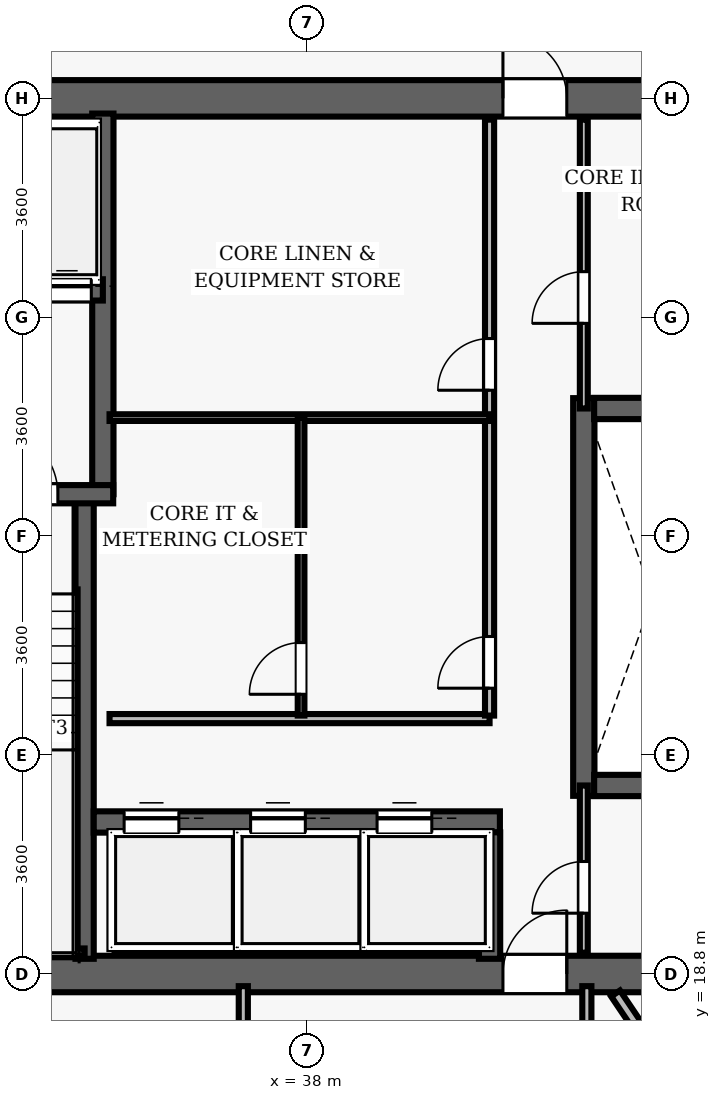
"""IFC4 building model, lengths in metres.
Left out: names, types, materials, properties, quantities, classifications, styles, units other than length and angle.
Written with IfcOpenShell. Run it as: python <this file> out.ifc"""

import sys

from ifc_helpers import new_model, si_unit, direction, frame, frame_2d, origin, place, context, subcontext, project, spatial, rectangle, extrude, element, fill, save


model = new_model("IFC4")
c1 = context("Model", 3, precision=1e-05, world=origin(), true_north=direction((0.0, 1.0)))
c2 = subcontext(c1, "Body", "Model", "MODEL_VIEW")
j1 = project(units=[si_unit("LENGTHUNIT", "METRE"), si_unit("PLANEANGLEUNIT", "RADIAN")], contexts=[c1])
p1 = place(None, origin())
s1 = spatial("IfcSite", under=j1, at=p1, CompositionType="ELEMENT")
p2 = place(p1, origin())
s2 = spatial("IfcBuilding", under=s1, at=p2, CompositionType="ELEMENT")
p3 = place(p2, frame((0.0, 0.0, 144.8)))
s3 = spatial("IfcBuildingStorey", under=s2, at=p3, CompositionType="ELEMENT", Elevation=144.8)
p4 = place(p3, frame((26.7, 18.8, 0.0), z_axis=(0.0, 0.0, 1.0), x_axis=(1.0, 0.0, 0.0)))
e1 = element("IfcWall", 1, at=p4, inside=s3, PredefinedType="SHEAR", context=c2, shape_type="SweptSolid", body=[
    extrude(rectangle(XDim=22.6, YDim=0.6, at=frame_2d((11.3, 0.0))), origin(), (0.0, 0.0, 1.0), 3.5),
])
p5 = place(p4, frame((14.52, 0.0, 0.0)))
e2 = element("IfcOpeningElement", 2, at=p5, cuts=e1, PredefinedType="OPENING", context=c2, shape_type="SweptSolid", body=[
    extrude(rectangle(XDim=1.05, YDim=2.15, at=frame_2d((0.525, 1.075))), frame((0.0, 0.31, 0.0), z_axis=(0.0, -1.0, 0.0), x_axis=(1.0, 0.0, 0.0)), (0.0, 0.0, 1.0), 0.62),
])
p6 = place(p3, frame((26.7, 33.2, 0.0), z_axis=(0.0, 0.0, 1.0), x_axis=(1.0, 0.0, 0.0)))
e3 = element("IfcWall", 3, at=p6, inside=s3, PredefinedType="SHEAR", context=c2, shape_type="SweptSolid", body=[
    extrude(rectangle(XDim=22.6, YDim=0.6, at=frame_2d((11.3, 0.0))), origin(), (0.0, 0.0, 1.0), 3.5),
])
p7 = place(p6, frame((4.62, 0.0, 0.0)))
e4 = element("IfcOpeningElement", 4, at=p7, cuts=e3, PredefinedType="OPENING", context=c2, shape_type="SweptSolid", body=[
    extrude(rectangle(XDim=1.05, YDim=2.15, at=frame_2d((0.525, 1.075))), frame((0.0, 0.31, 0.0), z_axis=(0.0, -1.0, 0.0), x_axis=(1.0, 0.0, 0.0)), (0.0, 0.0, 1.0), 0.62),
])
p8 = place(p6, frame((14.52, 0.0, 0.0)))
e5 = element("IfcOpeningElement", 5, at=p8, cuts=e3, PredefinedType="OPENING", context=c2, shape_type="SweptSolid", body=[
    extrude(rectangle(XDim=1.05, YDim=2.15, at=frame_2d((0.525, 1.075))), frame((0.0, 0.31, 0.0), z_axis=(0.0, -1.0, 0.0), x_axis=(1.0, 0.0, 0.0)), (0.0, 0.0, 1.0), 0.62),
])
p9 = place(p3, frame((34.34, 19.05, 0.0), z_axis=(0.0, 0.0, 1.0), x_axis=(0.0, 1.0, 0.0)))
e6 = element("IfcWall", 6, at=p9, inside=s3, PredefinedType="SHEAR", context=c2, shape_type="SweptSolid", body=[
    extrude(rectangle(XDim=7.5, YDim=0.3, at=frame_2d((3.75, 0.0))), origin(), (0.0, 0.0, 1.0), 3.5),
])
p10 = place(p3, frame((34.64, 26.69, 0.0), z_axis=(0.0, 0.0, 1.0), x_axis=(0.0, 1.0, 0.0)))
e7 = element("IfcWall", 7, at=p10, inside=s3, PredefinedType="SHEAR", context=c2, shape_type="SweptSolid", body=[
    extrude(rectangle(XDim=6.26, YDim=0.35, at=frame_2d((3.13, 0.0))), origin(), (0.0, 0.0, 1.0), 3.5),
])
p11 = place(p3, frame((31.25, 26.69, 0.0), z_axis=(0.0, 0.0, 1.0), x_axis=(1.0, 0.0, 0.0)))
e8 = element("IfcWall", 8, at=p11, inside=s3, PredefinedType="SHEAR", context=c2, shape_type="SweptSolid", body=[
    extrude(rectangle(XDim=3.56, YDim=0.3, at=frame_2d((1.78, 0.0))), origin(), (0.0, 0.0, 1.0), 3.5),
])
p12 = place(p11, frame((1.55, 0.0, 0.0)))
e9 = element("IfcOpeningElement", 9, at=p12, cuts=e8, PredefinedType="OPENING", context=c2, shape_type="SweptSolid", body=[
    extrude(rectangle(XDim=1.1, YDim=2.15, at=frame_2d((0.55, 1.075))), frame((0.0, 0.16, 0.0), z_axis=(0.0, -1.0, 0.0), x_axis=(1.0, 0.0, 0.0)), (0.0, 0.0, 1.0), 0.32),
])
p13 = place(p3, frame((31.3, 19.16, 0.0), z_axis=(0.0, 0.0, 1.0), x_axis=(1.0, 0.0, 0.0)))
e10 = element("IfcWall", 10, at=p13, inside=s3, PredefinedType="SHEAR", context=c2, shape_type="SweptSolid", body=[
    extrude(rectangle(XDim=3.04, YDim=0.12, at=frame_2d((1.52, 0.0))), origin(), (0.0, 0.0, 1.0), 3.5),
])
p14 = place(p3, frame((32.23, 30.05, 0.0), z_axis=(0.0, 0.0, 1.0), x_axis=(1.0, 0.0, 0.0)))
e11 = element("IfcWall", 11, at=p14, inside=s3, PredefinedType="SHEAR", context=c2, shape_type="SweptSolid", body=[
    extrude(rectangle(XDim=2.41, YDim=0.35, at=frame_2d((1.205, 0.0))), origin(), (0.0, 0.0, 1.0), 2.675),
])
p15 = place(p14, frame((0.42, 0.0, 0.0)))
e12 = element("IfcOpeningElement", 12, at=p15, cuts=e11, PredefinedType="OPENING", context=c2, shape_type="SweptSolid", body=[
    extrude(rectangle(XDim=0.8, YDim=2.15, at=frame_2d((0.4, 1.075))), frame((0.0, 0.185, 0.0), z_axis=(0.0, -1.0, 0.0), x_axis=(1.0, 0.0, 0.0)), (0.0, 0.0, 1.0), 0.37),
])
p16 = place(p14, frame((1.42, 0.0, 0.0)))
e13 = element("IfcOpeningElement", 13, at=p16, cuts=e11, PredefinedType="OPENING", context=c2, shape_type="SweptSolid", body=[
    extrude(rectangle(XDim=0.8, YDim=2.15, at=frame_2d((0.4, 1.075))), frame((0.0, 0.185, 0.0), z_axis=(0.0, -1.0, 0.0), x_axis=(1.0, 0.0, 0.0)), (0.0, 0.0, 1.0), 0.37),
])
p17 = place(p3, frame((42.55, 21.73, 0.0), z_axis=(0.0, 0.0, 1.0), x_axis=(0.0, 1.0, 0.0)))
e14 = element("IfcWall", 14, at=p17, inside=s3, PredefinedType="SHEAR", context=c2, shape_type="SweptSolid", body=[
    extrude(rectangle(XDim=6.54, YDim=0.35, at=frame_2d((3.27, 0.0))), origin(), (0.0, 0.0, 1.0), 2.675),
])
for number, where, z_axis, x_axis in (
    (15, (42.72, 21.9, 0.0), (0.0, 0.0, 1.0), (1.0, 0.0, 0.0)),
    (16, (42.72, 28.1, 0.0), (0.0, 0.0, 1.0), (1.0, 0.0, 0.0)),
):
    element("IfcWall", number, at=place(p3, frame(where, z_axis=z_axis, x_axis=x_axis)), inside=s3, PredefinedType="SHEAR", context=c2, shape_type="SweptSolid", body=[
        extrude(rectangle(XDim=2.03, YDim=0.35, at=frame_2d((1.015, 0.0))), origin(), (0.0, 0.0, 1.0), 2.675),
    ])
p18 = place(p3, frame((34.49, 21.3, 0.0), z_axis=(0.0, 0.0, 1.0), x_axis=(1.0, 0.0, 0.0)))
e17 = element("IfcWall", 17, at=p18, inside=s3, PredefinedType="SHEAR", context=c2, shape_type="SweptSolid", body=[
    extrude(rectangle(XDim=6.68, YDim=0.35, at=frame_2d((3.34, 0.0))), origin(), (0.0, 0.0, 1.0), 2.675),
])
p19 = place(p18, frame((0.5, 0.0, 0.0)))
e18 = element("IfcOpeningElement", 18, at=p19, cuts=e17, PredefinedType="OPENING", context=c2, shape_type="SweptSolid", body=[
    extrude(rectangle(XDim=0.9, YDim=2.15, at=frame_2d((0.45, 1.075))), frame((0.0, 0.185, 0.0), z_axis=(0.0, -1.0, 0.0), x_axis=(1.0, 0.0, 0.0)), (0.0, 0.0, 1.0), 0.37),
])
p20 = place(p18, frame((2.58, 0.0, 0.0)))
e19 = element("IfcOpeningElement", 19, at=p20, cuts=e17, PredefinedType="OPENING", context=c2, shape_type="SweptSolid", body=[
    extrude(rectangle(XDim=0.9, YDim=2.15, at=frame_2d((0.45, 1.075))), frame((0.0, 0.185, 0.0), z_axis=(0.0, -1.0, 0.0), x_axis=(1.0, 0.0, 0.0)), (0.0, 0.0, 1.0), 0.37),
])
p21 = place(p18, frame((4.66, 0.0, 0.0)))
e20 = element("IfcOpeningElement", 20, at=p21, cuts=e17, PredefinedType="OPENING", context=c2, shape_type="SweptSolid", body=[
    extrude(rectangle(XDim=0.9, YDim=2.15, at=frame_2d((0.45, 1.075))), frame((0.0, 0.185, 0.0), z_axis=(0.0, -1.0, 0.0), x_axis=(1.0, 0.0, 0.0)), (0.0, 0.0, 1.0), 0.37),
])
p22 = place(p3, frame((41.0, 19.05, 0.0), z_axis=(0.0, 0.0, 1.0), x_axis=(0.0, 1.0, 0.0)))
e21 = element("IfcWall", 21, at=p22, inside=s3, PredefinedType="SHEAR", context=c2, shape_type="SweptSolid", body=[
    extrude(rectangle(XDim=2.08, YDim=0.35, at=frame_2d((1.04, 0.0))), origin(), (0.0, 0.0, 1.0), 2.675),
])
p23 = place(p3, frame((34.75, 23.0, 0.0), z_axis=(0.0, 0.0, 1.0), x_axis=(1.0, 0.0, 0.0)))
e22 = element("IfcWall", 22, at=p23, inside=s3, PredefinedType="PARTITIONING", context=c2, shape_type="SweptSolid", body=[
    extrude(rectangle(XDim=6.25, YDim=0.15, at=frame_2d((3.125, 0.0))), origin(), (0.0, 0.0, 1.0), 2.675),
])
p24 = place(p3, frame((41.0, 23.05, 0.0), z_axis=(0.0, 0.0, 1.0), x_axis=(0.0, 1.0, 0.0)))
e23 = element("IfcWall", 23, at=p24, inside=s3, PredefinedType="PARTITIONING", context=c2, shape_type="SweptSolid", body=[
    extrude(rectangle(XDim=9.8, YDim=0.15, at=frame_2d((4.9, 0.0))), origin(), (0.0, 0.0, 1.0), 2.675),
])
p25 = place(p24, frame((5.35, 0.0, 0.0)))
e24 = element("IfcOpeningElement", 24, at=p25, cuts=e23, PredefinedType="OPENING", context=c2, shape_type="SweptSolid", body=[
    extrude(rectangle(XDim=0.85, YDim=2.1, at=frame_2d((0.425, 1.05))), frame((0.0, 0.085, 0.0), z_axis=(0.0, -1.0, 0.0), x_axis=(1.0, 0.0, 0.0)), (0.0, 0.0, 1.0), 0.17),
])
p26 = place(p24, frame((0.45, 0.0, 0.0)))
e25 = element("IfcOpeningElement", 25, at=p26, cuts=e23, PredefinedType="OPENING", context=c2, shape_type="SweptSolid", body=[
    extrude(rectangle(XDim=0.85, YDim=2.1, at=frame_2d((0.425, 1.05))), frame((0.0, 0.085, 0.0), z_axis=(0.0, -1.0, 0.0), x_axis=(1.0, 0.0, 0.0)), (0.0, 0.0, 1.0), 0.17),
])
p27 = place(p3, frame((34.75, 27.95, 0.0), z_axis=(0.0, 0.0, 1.0), x_axis=(1.0, 0.0, 0.0)))
e26 = element("IfcWall", 26, at=p27, inside=s3, PredefinedType="PARTITIONING", context=c2, shape_type="SweptSolid", body=[
    extrude(rectangle(XDim=6.25, YDim=0.11, at=frame_2d((3.125, 0.0))), origin(), (0.0, 0.0, 1.0), 2.675),
])
p28 = place(p3, frame((37.9, 23.05, 0.0), z_axis=(0.0, 0.0, 1.0), x_axis=(0.0, 1.0, 0.0)))
e27 = element("IfcWall", 27, at=p28, inside=s3, PredefinedType="PARTITIONING", context=c2, shape_type="SweptSolid", body=[
    extrude(rectangle(XDim=4.9, YDim=0.11, at=frame_2d((2.45, 0.0))), origin(), (0.0, 0.0, 1.0), 2.675),
])
p29 = place(p28, frame((0.35, 0.0, 0.0)))
e28 = element("IfcOpeningElement", 28, at=p29, cuts=e27, PredefinedType="OPENING", context=c2, shape_type="SweptSolid", body=[
    extrude(rectangle(XDim=0.85, YDim=2.1, at=frame_2d((0.425, 1.05))), frame((0.0, 0.065, 0.0), z_axis=(0.0, -1.0, 0.0), x_axis=(1.0, 0.0, 0.0)), (0.0, 0.0, 1.0), 0.13),
])
p30 = place(p3, frame((42.55, 28.1, 0.0), z_axis=(0.0, 0.0, 1.0), x_axis=(0.0, 1.0, 0.0)))
e29 = element("IfcWall", 29, at=p30, inside=s3, PredefinedType="PARTITIONING", context=c2, shape_type="SweptSolid", body=[
    extrude(rectangle(XDim=4.75, YDim=0.13, at=frame_2d((2.375, 0.0))), origin(), (0.0, 0.0, 1.0), 2.675),
])
p31 = place(p30, frame((1.4, 0.0, 0.0)))
e30 = element("IfcOpeningElement", 30, at=p31, cuts=e29, PredefinedType="OPENING", context=c2, shape_type="SweptSolid", body=[
    extrude(rectangle(XDim=0.85, YDim=2.1, at=frame_2d((0.425, 1.05))), frame((0.0, 0.075, 0.0), z_axis=(0.0, -1.0, 0.0), x_axis=(1.0, 0.0, 0.0)), (0.0, 0.0, 1.0), 0.15),
])
p32 = place(p3, frame((42.55, 19.15, 0.0), z_axis=(0.0, 0.0, 1.0), x_axis=(0.0, 1.0, 0.0)))
e31 = element("IfcWall", 31, at=p32, inside=s3, PredefinedType="PARTITIONING", context=c2, shape_type="SweptSolid", body=[
    extrude(rectangle(XDim=2.75, YDim=0.13, at=frame_2d((1.375, 0.0))), origin(), (0.0, 0.0, 1.0), 2.675),
])
p33 = place(p32, frame((0.65, 0.0, 0.0)))
e32 = element("IfcOpeningElement", 32, at=p33, cuts=e31, PredefinedType="OPENING", context=c2, shape_type="SweptSolid", body=[
    extrude(rectangle(XDim=0.85, YDim=2.1, at=frame_2d((0.425, 1.05))), frame((0.0, 0.075, 0.0), z_axis=(0.0, -1.0, 0.0), x_axis=(1.0, 0.0, 0.0)), (0.0, 0.0, 1.0), 0.15),
])
p34 = place(p3, frame((36.95, 11.2, 0.0), z_axis=(0.0, 0.0, 1.0), x_axis=(0.0, 1.0, 0.0)))
e33 = element("IfcWall", 33, at=p34, inside=s3, PredefinedType="PARTITIONING", context=c2, shape_type="SweptSolid", body=[
    extrude(rectangle(XDim=7.4, YDim=0.15, at=frame_2d((3.7, 0.0))), origin(), (0.0, 0.0, 1.0), 2.675),
])
p35 = place(p34, frame((5.237, 0.0, 0.0)))
e34 = element("IfcOpeningElement", 34, at=p35, cuts=e33, PredefinedType="OPENING", context=c2, shape_type="SweptSolid", body=[
    extrude(rectangle(XDim=1.5, YDim=2.2, at=frame_2d((0.75, 1.1))), frame((0.0, 0.085, 0.0), z_axis=(0.0, -1.0, 0.0), x_axis=(1.0, 0.0, 0.0)), (0.0, 0.0, 1.0), 0.17),
])
p36 = place(p3, frame((42.6, 16.65, 0.0), z_axis=(0.0, 0.0, 1.0), x_axis=(0.0, 1.0, 0.0)))
e35 = element("IfcWall", 35, at=p36, inside=s3, PredefinedType="PARTITIONING", context=c2, shape_type="SweptSolid", body=[
    extrude(rectangle(XDim=1.95, YDim=0.15, at=frame_2d((0.975, 0.0))), origin(), (0.0, 0.0, 1.0), 2.675),
])
p37 = place(p3, frame((43.072, 18.48, 0.0), z_axis=(0.0, 0.0, 1.0), x_axis=(0.559194878042, -0.829036240687, 0.0)))
e36 = element("IfcWall", 36, at=p37, inside=s3, PredefinedType="PARTITIONING", context=c2, shape_type="SweptSolid", body=[
    extrude(rectangle(XDim=18.556, YDim=0.175, at=frame_2d((9.278, 0.0))), origin(), (0.0, 0.0, 1.0), 2.675),
])
p38 = place(p12, origin())
e37 = element("IfcDoor", 37, at=p38, inside=s3, OperationType="SINGLE_SWING_LEFT", PredefinedType="DOOR", context=c2, shape_type="SweptSolid", body=[
    extrude(rectangle(XDim=1.1, YDim=2.15, at=frame_2d((0.55, 1.075))), frame((0.0, 0.025, 0.0), z_axis=(0.0, -1.0, 0.0), x_axis=(1.0, 0.0, 0.0)), (0.0, 0.0, 1.0), 0.05),
])
fill(e9, e37)
p39 = place(p8, origin())
e38 = element("IfcDoor", 38, at=p39, inside=s3, OperationType="SINGLE_SWING_LEFT", PredefinedType="DOOR", context=c2, shape_type="SweptSolid", body=[
    extrude(rectangle(XDim=1.05, YDim=2.15, at=frame_2d((0.525, 1.075))), frame((0.0, 0.025, 0.0), z_axis=(0.0, -1.0, 0.0), x_axis=(1.0, 0.0, 0.0)), (0.0, 0.0, 1.0), 0.05),
])
fill(e5, e38)
p40 = place(p5, origin())
e39 = element("IfcDoor", 39, at=p40, inside=s3, OperationType="SINGLE_SWING_RIGHT", PredefinedType="DOOR", context=c2, shape_type="SweptSolid", body=[
    extrude(rectangle(XDim=1.05, YDim=2.15, at=frame_2d((0.525, 1.075))), frame((0.0, 0.025, 0.0), z_axis=(0.0, -1.0, 0.0), x_axis=(1.0, 0.0, 0.0)), (0.0, 0.0, 1.0), 0.05),
])
fill(e2, e39)
p41 = place(p25, origin())
e40 = element("IfcDoor", 40, at=p41, inside=s3, OperationType="SINGLE_SWING_LEFT", PredefinedType="DOOR", context=c2, shape_type="SweptSolid", body=[
    extrude(rectangle(XDim=0.85, YDim=2.1, at=frame_2d((0.425, 1.05))), frame((0.0, 0.025, 0.0), z_axis=(0.0, -1.0, 0.0), x_axis=(1.0, 0.0, 0.0)), (0.0, 0.0, 1.0), 0.05),
])
fill(e24, e40)
p42 = place(p26, origin())
e41 = element("IfcDoor", 41, at=p42, inside=s3, OperationType="SINGLE_SWING_LEFT", PredefinedType="DOOR", context=c2, shape_type="SweptSolid", body=[
    extrude(rectangle(XDim=0.85, YDim=2.1, at=frame_2d((0.425, 1.05))), frame((0.0, 0.025, 0.0), z_axis=(0.0, -1.0, 0.0), x_axis=(1.0, 0.0, 0.0)), (0.0, 0.0, 1.0), 0.05),
])
fill(e25, e41)
p43 = place(p29, origin())
e42 = element("IfcDoor", 42, at=p43, inside=s3, OperationType="SINGLE_SWING_LEFT", PredefinedType="DOOR", context=c2, shape_type="SweptSolid", body=[
    extrude(rectangle(XDim=0.85, YDim=2.1, at=frame_2d((0.425, 1.05))), frame((0.0, 0.025, 0.0), z_axis=(0.0, -1.0, 0.0), x_axis=(1.0, 0.0, 0.0)), (0.0, 0.0, 1.0), 0.05),
])
fill(e28, e42)
p44 = place(p31, origin())
e43 = element("IfcDoor", 43, at=p44, inside=s3, OperationType="SINGLE_SWING_LEFT", PredefinedType="DOOR", context=c2, shape_type="SweptSolid", body=[
    extrude(rectangle(XDim=0.85, YDim=2.1, at=frame_2d((0.425, 1.05))), frame((0.0, 0.025, 0.0), z_axis=(0.0, -1.0, 0.0), x_axis=(1.0, 0.0, 0.0)), (0.0, 0.0, 1.0), 0.05),
])
fill(e30, e43)
p45 = place(p33, origin())
e44 = element("IfcDoor", 44, at=p45, inside=s3, OperationType="SINGLE_SWING_LEFT", PredefinedType="DOOR", context=c2, shape_type="SweptSolid", body=[
    extrude(rectangle(XDim=0.85, YDim=2.1, at=frame_2d((0.425, 1.05))), frame((0.0, 0.025, 0.0), z_axis=(0.0, -1.0, 0.0), x_axis=(1.0, 0.0, 0.0)), (0.0, 0.0, 1.0), 0.05),
])
fill(e32, e44)
p46 = place(p19, origin())
e45 = element("IfcDoor", 45, at=p46, inside=s3, OperationType="SLIDING_TO_LEFT", PredefinedType="DOOR", context=c2, shape_type="SweptSolid", body=[
    extrude(rectangle(XDim=0.9, YDim=2.15, at=frame_2d((0.45, 1.075))), frame((0.0, 0.025, 0.0), z_axis=(0.0, -1.0, 0.0), x_axis=(1.0, 0.0, 0.0)), (0.0, 0.0, 1.0), 0.05),
])
fill(e18, e45)
p47 = place(p20, origin())
e46 = element("IfcDoor", 46, at=p47, inside=s3, OperationType="SLIDING_TO_LEFT", PredefinedType="DOOR", context=c2, shape_type="SweptSolid", body=[
    extrude(rectangle(XDim=0.9, YDim=2.15, at=frame_2d((0.45, 1.075))), frame((0.0, 0.025, 0.0), z_axis=(0.0, -1.0, 0.0), x_axis=(1.0, 0.0, 0.0)), (0.0, 0.0, 1.0), 0.05),
])
fill(e19, e46)
p48 = place(p21, origin())
e47 = element("IfcDoor", 47, at=p48, inside=s3, OperationType="SLIDING_TO_LEFT", PredefinedType="DOOR", context=c2, shape_type="SweptSolid", body=[
    extrude(rectangle(XDim=0.9, YDim=2.15, at=frame_2d((0.45, 1.075))), frame((0.0, 0.025, 0.0), z_axis=(0.0, -1.0, 0.0), x_axis=(1.0, 0.0, 0.0)), (0.0, 0.0, 1.0), 0.05),
])
fill(e20, e47)
p49 = place(p16, origin())
e48 = element("IfcDoor", 48, at=p49, inside=s3, OperationType="SLIDING_TO_LEFT", PredefinedType="DOOR", context=c2, shape_type="SweptSolid", body=[
    extrude(rectangle(XDim=0.8, YDim=2.15, at=frame_2d((0.4, 1.075))), frame((0.0, 0.025, 0.0), z_axis=(0.0, -1.0, 0.0), x_axis=(1.0, 0.0, 0.0)), (0.0, 0.0, 1.0), 0.05),
])
fill(e13, e48)
save(model, sys.argv[1])
